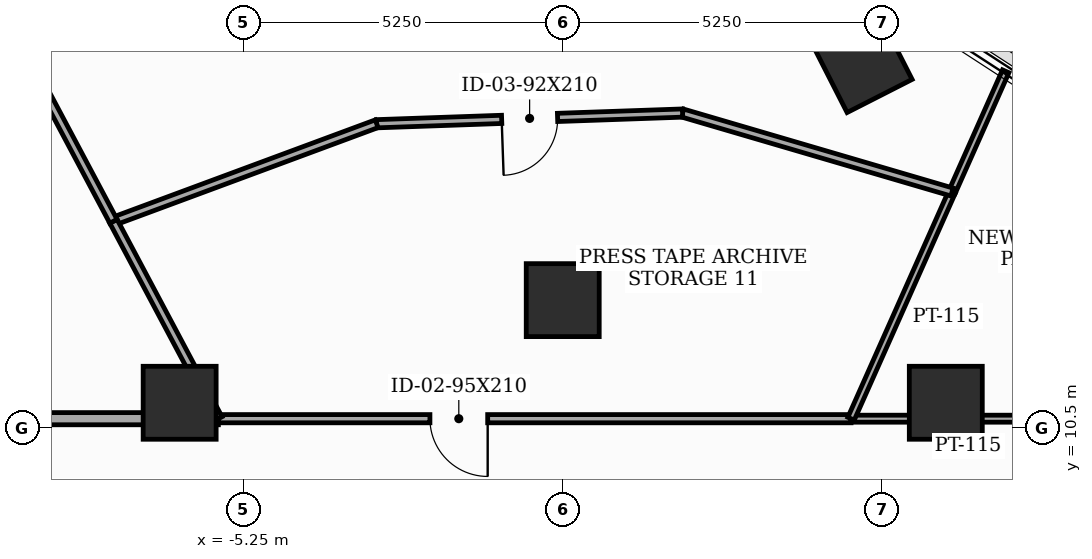
"""IFC4 building model, lengths in metres.
Left out: names, types, materials, properties, quantities, classifications, styles, units other than length and angle.
Written with IfcOpenShell. Run it as: python <this file> out.ifc"""

import sys

from ifc_helpers import new_model, si_unit, direction, frame, frame_2d, origin, origin_2d, place, context, subcontext, project, spatial, rectangle, extrude, element, fill, save


model = new_model("IFC4")
c1 = context("Model", 3, precision=1e-05, world=origin(), true_north=direction((0.0, 1.0)))
c2 = subcontext(c1, "Body", "Model", "MODEL_VIEW")
j1 = project(units=[si_unit("LENGTHUNIT", "METRE"), si_unit("PLANEANGLEUNIT", "RADIAN")], contexts=[c1])
p1 = place(None, origin())
s1 = spatial("IfcSite", under=j1, at=p1, CompositionType="ELEMENT")
p2 = place(p1, origin())
s2 = spatial("IfcBuilding", under=s1, at=p2, CompositionType="ELEMENT")
p3 = place(p2, frame((0.0, 0.0, 142.1)))
s3 = spatial("IfcBuildingStorey", under=s2, at=p3, CompositionType="ELEMENT", Elevation=142.1)
for number, where, z_axis, x_axis in (
    (1, (6.3, 10.912, 0.0), (0.0, 0.0, 1.0), (1.0, 0.0, 0.0)),
    (2, (0.0, 12.6, 0.0), (0.0, 0.0, 1.0), (1.0, 0.0, 0.0)),
    (3, (-6.3, 10.912, 0.0), (0.0, 0.0, 1.0), (1.0, 0.0, 0.0)),
    (4, (4.939, 16.492, 0.0), (0.0, 0.0, 1.0), (0.891, 0.454, 0.0)),
):
    element("IfcColumn", number, at=place(p3, frame(where, z_axis=z_axis, x_axis=x_axis)), inside=s3, PredefinedType="COLUMN", context=c2, shape_type="SweptSolid", body=[
        extrude(rectangle(XDim=1.2, YDim=1.2, at=origin_2d()), origin(), (0.0, 0.0, 1.0), 3.7),
    ])
p4 = place(p3, frame((10.15, 10.65, 0.0), z_axis=(0.0, 0.0, 1.0), x_axis=(-1.0, 0.0, 0.0)))
e5 = element("IfcWall", 5, at=p4, inside=s3, PredefinedType="PARTITIONING", context=c2, shape_type="SweptSolid", body=[
    extrude(rectangle(XDim=5.408, YDim=0.115, at=frame_2d((2.704, 0.0))), origin(), (0.0, 0.0, 1.0), 2.785),
])
p5 = place(p4, frame((0.607, 0.0, 0.0)))
e6 = element("IfcOpeningElement", 6, at=p5, cuts=e5, PredefinedType="OPENING", context=c2, shape_type="SweptSolid", body=[
    extrude(rectangle(XDim=0.95, YDim=2.1, at=frame_2d((0.475, 1.05))), frame((0.0, 0.067, 0.0), z_axis=(0.0, -1.0, 0.0), x_axis=(1.0, 0.0, 0.0)), (0.0, 0.0, 1.0), 0.135),
])
p6 = place(p3, frame((4.742, 10.65, 0.0), z_axis=(0.0, 0.0, 1.0), x_axis=(-1.0, 0.0, 0.0)))
e7 = element("IfcWall", 7, at=p6, inside=s3, PredefinedType="PARTITIONING", context=c2, shape_type="SweptSolid", body=[
    extrude(rectangle(XDim=10.405, YDim=0.135, at=frame_2d((5.203, 0.0))), origin(), (0.0, 0.0, 1.0), 2.785),
])
p7 = place(p6, frame((5.976, 0.0, 0.0)))
e8 = element("IfcOpeningElement", 8, at=p7, cuts=e7, PredefinedType="OPENING", context=c2, shape_type="SweptSolid", body=[
    extrude(rectangle(XDim=0.95, YDim=2.1, at=frame_2d((0.475, 1.05))), frame((0.0, 0.077, 0.0), z_axis=(0.0, -1.0, 0.0), x_axis=(1.0, 0.0, 0.0)), (0.0, 0.0, 1.0), 0.155),
])
p8 = place(p3, frame((-5.663, 10.65, 0.0), z_axis=(0.0, 0.0, 1.0), x_axis=(-1.0, 0.0, 0.0)))
e9 = element("IfcWall", 9, at=p8, inside=s3, PredefinedType="SOLIDWALL", context=c2, shape_type="SweptSolid", body=[
    extrude(rectangle(XDim=4.487, YDim=0.2, at=frame_2d((2.243, 0.0))), origin(), (0.0, 0.0, 1.0), 2.785),
])
p9 = place(p3, frame((6.402, 14.378, 0.0), z_axis=(0.0, 0.0, 1.0), x_axis=(-0.406804441844, -0.913515268671, 0.0)))
e10 = element("IfcWall", 10, at=p9, inside=s3, PredefinedType="PARTITIONING", context=c2, shape_type="SweptSolid", body=[
    extrude(rectangle(XDim=4.081, YDim=0.115, at=frame_2d((2.041, 0.0))), origin(), (0.0, 0.0, 1.0), 2.785),
])
p10 = place(p3, frame((7.285, 16.364, 0.0), z_axis=(0.0, 0.0, 1.0), x_axis=(-0.406367721617, -0.913709622817, 0.0)))
e11 = element("IfcWall", 11, at=p10, inside=s3, PredefinedType="PARTITIONING", context=c2, shape_type="SweptSolid", body=[
    extrude(rectangle(XDim=2.174, YDim=0.115, at=frame_2d((1.087, 0.0))), origin(), (0.0, 0.0, 1.0), 2.985),
])
p11 = place(p3, frame((6.402, 14.378, 0.0), z_axis=(0.0, 0.0, 1.0), x_axis=(-0.959611810986, 0.2813275177, 0.0)))
e12 = element("IfcWall", 12, at=p11, inside=s3, PredefinedType="PARTITIONING", context=c2, shape_type="SweptSolid", body=[
    extrude(rectangle(XDim=4.618, YDim=0.135, at=frame_2d((2.309, 0.0))), origin(), (0.0, 0.0, 1.0), 2.885),
])
p12 = place(p3, frame((1.971, 15.677, 0.0), z_axis=(0.0, 0.0, 1.0), x_axis=(-0.999388477448, -0.034966714817, 0.0)))
e13 = element("IfcWall", 13, at=p12, inside=s3, PredefinedType="PARTITIONING", context=c2, shape_type="SweptSolid", body=[
    extrude(rectangle(XDim=5.034, YDim=0.135, at=frame_2d((2.517, 0.0))), origin(), (0.0, 0.0, 1.0), 2.885),
])
p13 = place(p12, frame((2.057, 0.0, 0.0)))
e14 = element("IfcOpeningElement", 14, at=p13, cuts=e13, PredefinedType="OPENING", context=c2, shape_type="SweptSolid", body=[
    extrude(rectangle(XDim=0.92, YDim=2.1, at=frame_2d((0.46, 1.05))), frame((0.0, 0.077, 0.0), z_axis=(0.0, -1.0, 0.0), x_axis=(1.0, 0.0, 0.0)), (0.0, 0.0, 1.0), 0.155),
])
p14 = place(p3, frame((-3.06, 15.501, 0.0), z_axis=(0.0, 0.0, 1.0), x_axis=(-0.937697715957, -0.347452145611, 0.0)))
e15 = element("IfcWall", 15, at=p14, inside=s3, PredefinedType="PARTITIONING", context=c2, shape_type="SweptSolid", body=[
    extrude(rectangle(XDim=4.616, YDim=0.135, at=frame_2d((2.308, 0.0))), origin(), (0.0, 0.0, 1.0), 3.5),
])
p15 = place(p3, frame((-7.389, 13.897, 0.0), z_axis=(0.0, 0.0, 1.0), x_axis=(0.469329971657, -0.883022863636, 0.0)))
e16 = element("IfcWall", 16, at=p15, inside=s3, PredefinedType="PARTITIONING", context=c2, shape_type="SweptSolid", body=[
    extrude(rectangle(XDim=3.677, YDim=0.135, at=frame_2d((1.839, 0.0))), origin(), (0.0, 0.0, 1.0), 2.785),
])
p16 = place(p3, frame((-14.797, 27.829, 0.0), z_axis=(0.0, 0.0, 1.0), x_axis=(0.469495702595, -0.882934757072, 0.0)))
e17 = element("IfcWall", 17, at=p16, inside=s3, PredefinedType="PARTITIONING", context=c2, shape_type="SweptSolid", body=[
    extrude(rectangle(XDim=15.779, YDim=0.135, at=frame_2d((7.89, 0.0))), origin(), (0.0, 0.0, 1.0), 2.985),
])
p17 = place(p7, origin())
e18 = element("IfcDoor", 18, at=p17, inside=s3, OperationType="SINGLE_SWING_LEFT", PredefinedType="DOOR", context=c2, shape_type="SweptSolid", body=[
    extrude(rectangle(XDim=0.95, YDim=2.1, at=frame_2d((0.475, 1.05))), frame((0.0, 0.025, 0.0), z_axis=(0.0, -1.0, 0.0), x_axis=(1.0, 0.0, 0.0)), (0.0, 0.0, 1.0), 0.05),
])
fill(e8, e18)
p18 = place(p13, origin())
e19 = element("IfcDoor", 19, at=p18, inside=s3, OperationType="SINGLE_SWING_RIGHT", PredefinedType="DOOR", context=c2, shape_type="SweptSolid", body=[
    extrude(rectangle(XDim=0.92, YDim=2.1, at=frame_2d((0.46, 1.05))), frame((0.0, 0.025, 0.0), z_axis=(0.0, -1.0, 0.0), x_axis=(1.0, 0.0, 0.0)), (0.0, 0.0, 1.0), 0.05),
])
fill(e14, e19)
save(model, sys.argv[1])
